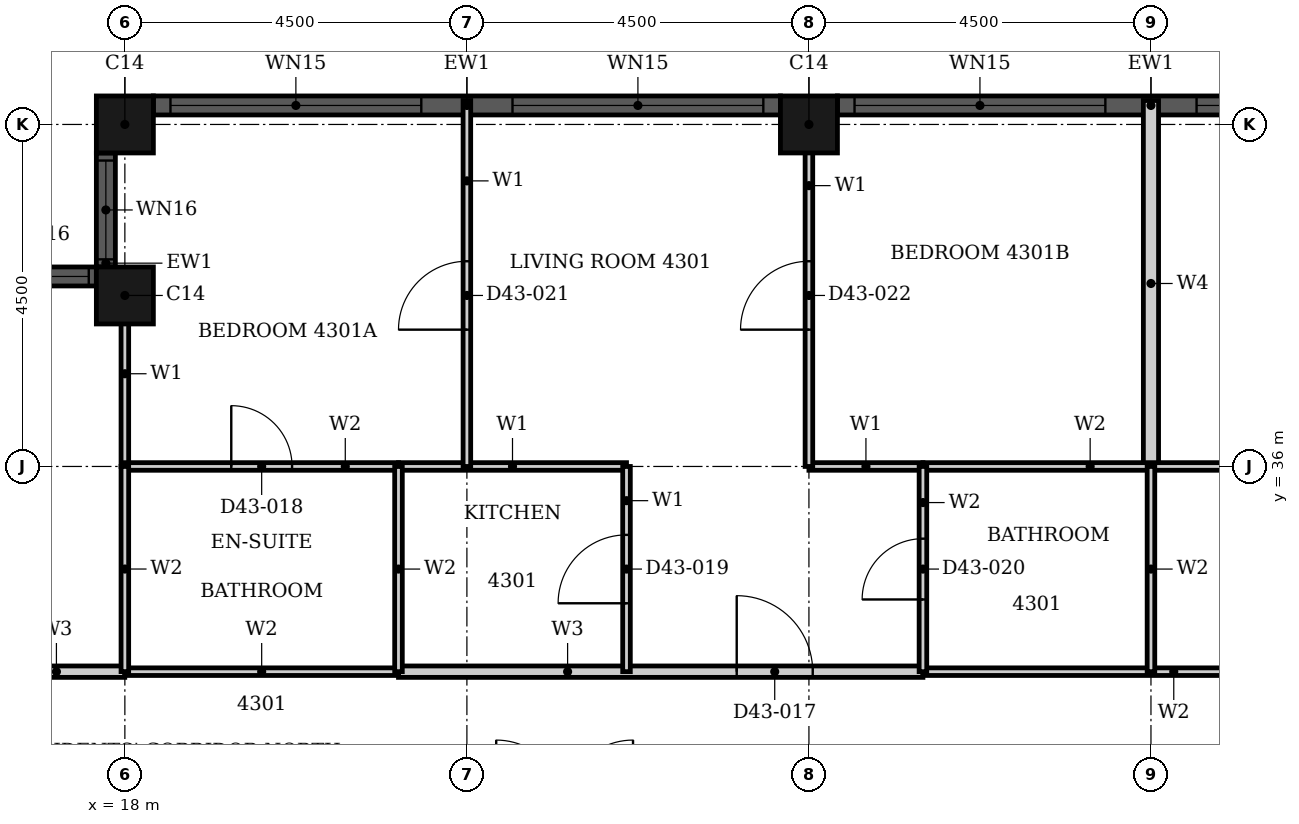
"""IFC4 building model, lengths in metres.
Left out: names, types, materials, properties, quantities, classifications, styles, units other than length and angle.
Written with IfcOpenShell. Run it as: python <this file> out.ifc"""

import sys

from ifc_helpers import new_model, si_unit, direction, frame, frame_2d, origin, origin_2d, place, context, subcontext, project, spatial, rectangle, hollow_rectangle, extrude, element, fill, save


model = new_model("IFC4")
c1 = context("Model", 3, precision=1e-05, world=origin(), true_north=direction((0.0, 1.0)))
c2 = subcontext(c1, "Body", "Model", "MODEL_VIEW")
j1 = project(units=[si_unit("LENGTHUNIT", "METRE"), si_unit("PLANEANGLEUNIT", "RADIAN")], contexts=[c1])
p1 = place(None, origin())
s1 = spatial("IfcSite", under=j1, at=p1, CompositionType="ELEMENT")
p2 = place(p1, origin())
s2 = spatial("IfcBuilding", under=s1, at=p2, CompositionType="ELEMENT")
p3 = place(p2, frame((0.0, 0.0, 172.8)))
s3 = spatial("IfcBuildingStorey", under=s2, at=p3, CompositionType="ELEMENT", Elevation=172.8)
for number, where, z_axis, x_axis in (
    (1, (27.0, 40.5, 0.0), (0.0, 0.0, 1.0), (1.0, 0.0, 0.0)),
    (2, (18.0, 40.5, 0.0), (0.0, 0.0, 1.0), (1.0, 0.0, 0.0)),
    (3, (18.0, 38.25, 0.0), (0.0, 0.0, 1.0), (1.0, 0.0, 0.0)),
):
    element("IfcColumn", number, at=place(p3, frame(where, z_axis=z_axis, x_axis=x_axis)), inside=s3, PredefinedType="COLUMN", context=c2, shape_type="SweptSolid", body=[
        extrude(hollow_rectangle(XDim=0.75, YDim=0.75, WallThickness=0.024, at=origin_2d()), origin(), (0.0, 0.0, 1.0), 3.7),
    ])
p4 = place(p3, frame((35.625, 40.75, 0.0), z_axis=(0.0, 0.0, 1.0), x_axis=(-1.0, 0.0, 0.0)))
e4 = element("IfcWall", 4, at=p4, inside=s3, PredefinedType="SOLIDWALL", context=c2, shape_type="SweptSolid", body=[
    extrude(rectangle(XDim=8.25, YDim=0.25, at=frame_2d((4.125, 0.0))), origin(), (0.0, 0.0, 1.0), 3.7),
])
p5 = place(p4, frame((0.225, 0.0, 0.45)))
e5 = element("IfcOpeningElement", 5, at=p5, cuts=e4, PredefinedType="OPENING", context=c2, shape_type="SweptSolid", body=[
    extrude(rectangle(XDim=3.3, YDim=2.3, at=frame_2d((1.65, 1.15))), frame((0.0, 0.135, 0.0), z_axis=(0.0, -1.0, 0.0), x_axis=(1.0, 0.0, 0.0)), (0.0, 0.0, 1.0), 0.27),
])
p6 = place(p4, frame((4.725, 0.0, 0.45)))
e6 = element("IfcOpeningElement", 6, at=p6, cuts=e4, PredefinedType="OPENING", context=c2, shape_type="SweptSolid", body=[
    extrude(rectangle(XDim=3.3, YDim=2.3, at=frame_2d((1.65, 1.15))), frame((0.0, 0.135, 0.0), z_axis=(0.0, -1.0, 0.0), x_axis=(1.0, 0.0, 0.0)), (0.0, 0.0, 1.0), 0.27),
])
p7 = place(p3, frame((26.625, 40.75, 0.0), z_axis=(0.0, 0.0, 1.0), x_axis=(-1.0, 0.0, 0.0)))
e7 = element("IfcWall", 7, at=p7, inside=s3, PredefinedType="SOLIDWALL", context=c2, shape_type="SweptSolid", body=[
    extrude(rectangle(XDim=8.25, YDim=0.25, at=frame_2d((4.125, 0.0))), origin(), (0.0, 0.0, 1.0), 3.7),
])
p8 = place(p7, frame((0.225, 0.0, 0.45)))
e8 = element("IfcOpeningElement", 8, at=p8, cuts=e7, PredefinedType="OPENING", context=c2, shape_type="SweptSolid", body=[
    extrude(rectangle(XDim=3.3, YDim=2.3, at=frame_2d((1.65, 1.15))), frame((0.0, 0.135, 0.0), z_axis=(0.0, -1.0, 0.0), x_axis=(1.0, 0.0, 0.0)), (0.0, 0.0, 1.0), 0.27),
])
p9 = place(p7, frame((4.725, 0.0, 0.45)))
e9 = element("IfcOpeningElement", 9, at=p9, cuts=e7, PredefinedType="OPENING", context=c2, shape_type="SweptSolid", body=[
    extrude(rectangle(XDim=3.3, YDim=2.3, at=frame_2d((1.65, 1.15))), frame((0.0, 0.135, 0.0), z_axis=(0.0, -1.0, 0.0), x_axis=(1.0, 0.0, 0.0)), (0.0, 0.0, 1.0), 0.27),
])
p10 = place(p3, frame((17.75, 40.125, 0.0), z_axis=(0.0, 0.0, 1.0), x_axis=(0.0, -1.0, 0.0)))
e10 = element("IfcWall", 10, at=p10, inside=s3, PredefinedType="SOLIDWALL", context=c2, shape_type="SweptSolid", body=[
    extrude(rectangle(XDim=1.5, YDim=0.25, at=frame_2d((0.75, 0.0))), origin(), (0.0, 0.0, 1.0), 3.7),
])
p11 = place(p10, frame((0.1, 0.0, 0.9)))
e11 = element("IfcOpeningElement", 11, at=p11, cuts=e10, PredefinedType="OPENING", context=c2, shape_type="SweptSolid", body=[
    extrude(rectangle(XDim=1.3, YDim=1.85, at=frame_2d((0.65, 0.925))), frame((0.0, 0.135, 0.0), z_axis=(0.0, -1.0, 0.0), x_axis=(1.0, 0.0, 0.0)), (0.0, 0.0, 1.0), 0.27),
])
p12 = place(p3, frame((17.625, 38.5, 0.0), z_axis=(0.0, 0.0, 1.0), x_axis=(-1.0, 0.0, 0.0)))
e12 = element("IfcWall", 12, at=p12, inside=s3, PredefinedType="SOLIDWALL", context=c2, shape_type="SweptSolid", body=[
    extrude(rectangle(XDim=1.5, YDim=0.25, at=frame_2d((0.75, 0.0))), origin(), (0.0, 0.0, 1.0), 3.7),
])
p13 = place(p12, frame((0.1, 0.0, 0.9)))
e13 = element("IfcOpeningElement", 13, at=p13, cuts=e12, PredefinedType="OPENING", context=c2, shape_type="SweptSolid", body=[
    extrude(rectangle(XDim=1.3, YDim=1.85, at=frame_2d((0.65, 0.925))), frame((0.0, 0.135, 0.0), z_axis=(0.0, -1.0, 0.0), x_axis=(1.0, 0.0, 0.0)), (0.0, 0.0, 1.0), 0.27),
])
p14 = place(p3, frame((21.6, 33.3, 0.0), z_axis=(0.0, 0.0, 1.0), x_axis=(1.0, 0.0, 0.0)))
e14 = element("IfcWall", 14, at=p14, inside=s3, PredefinedType="PARTITIONING", context=c2, shape_type="SweptSolid", body=[
    extrude(rectangle(XDim=6.9, YDim=0.15, at=frame_2d((3.45, 0.0))), origin(), (0.0, 0.0, 1.0), 3.4),
])
p15 = place(p14, frame((4.45, 0.0, 0.0)))
e15 = element("IfcOpeningElement", 15, at=p15, cuts=e14, PredefinedType="OPENING", context=c2, shape_type="SweptSolid", body=[
    extrude(rectangle(XDim=1.0, YDim=2.2, at=frame_2d((0.5, 1.1))), frame((0.0, 0.085, 0.0), z_axis=(0.0, -1.0, 0.0), x_axis=(1.0, 0.0, 0.0)), (0.0, 0.0, 1.0), 0.17),
])
p16 = place(p3, frame((16.2, 33.3, 0.0), z_axis=(0.0, 0.0, 1.0), x_axis=(1.0, 0.0, 0.0)))
e16 = element("IfcWall", 16, at=p16, inside=s3, PredefinedType="PARTITIONING", context=c2, shape_type="SweptSolid", body=[
    extrude(rectangle(XDim=1.799, YDim=0.15, at=frame_2d((0.899, 0.0))), origin(), (0.0, 0.0, 1.0), 3.4),
])
p17 = place(p3, frame((27.0, 36.0, 0.0), z_axis=(0.0, 0.0, 1.0), x_axis=(1.0, 0.0, 0.0)))
e17 = element("IfcWall", 17, at=p17, inside=s3, PredefinedType="PARTITIONING", context=c2, shape_type="SweptSolid", body=[
    extrude(rectangle(XDim=1.5, YDim=0.1, at=frame_2d((0.75, 0.0))), origin(), (0.0, 0.0, 1.0), 3.4),
])
p18 = place(p3, frame((21.6, 36.0, 0.0), z_axis=(0.0, 0.0, 1.0), x_axis=(1.0, 0.0, 0.0)))
e18 = element("IfcWall", 18, at=p18, inside=s3, PredefinedType="PARTITIONING", context=c2, shape_type="SweptSolid", body=[
    extrude(rectangle(XDim=3.0, YDim=0.1, at=frame_2d((1.5, 0.0))), origin(), (0.0, 0.0, 1.0), 3.4),
])
p19 = place(p3, frame((18.0, 36.0, 0.0), z_axis=(0.0, 0.0, 1.0), x_axis=(0.0, 1.0, 0.0)))
e19 = element("IfcWall", 19, at=p19, inside=s3, PredefinedType="PARTITIONING", context=c2, shape_type="SweptSolid", body=[
    extrude(rectangle(XDim=2.44, YDim=0.1, at=frame_2d((1.22, 0.0))), origin(), (0.0, 0.0, 1.0), 3.4),
])
p20 = place(p3, frame((22.5, 36.0, 0.0), z_axis=(0.0, 0.0, 1.0), x_axis=(0.0, 1.0, 0.0)))
e20 = element("IfcWall", 20, at=p20, inside=s3, PredefinedType="PARTITIONING", context=c2, shape_type="SweptSolid", body=[
    extrude(rectangle(XDim=4.815, YDim=0.1, at=frame_2d((2.407, 0.0))), origin(), (0.0, 0.0, 1.0), 3.4),
])
p21 = place(p20, frame((1.8, 0.0, 0.0)))
e21 = element("IfcOpeningElement", 21, at=p21, cuts=e20, PredefinedType="OPENING", context=c2, shape_type="SweptSolid", body=[
    extrude(rectangle(XDim=0.9, YDim=2.1, at=frame_2d((0.45, 1.05))), frame((0.0, 0.06, 0.0), z_axis=(0.0, -1.0, 0.0), x_axis=(1.0, 0.0, 0.0)), (0.0, 0.0, 1.0), 0.12),
])
p22 = place(p3, frame((24.6, 33.3, 0.0), z_axis=(0.0, 0.0, 1.0), x_axis=(0.0, 1.0, 0.0)))
e22 = element("IfcWall", 22, at=p22, inside=s3, PredefinedType="PARTITIONING", context=c2, shape_type="SweptSolid", body=[
    extrude(rectangle(XDim=2.7, YDim=0.1, at=frame_2d((1.35, 0.0))), origin(), (0.0, 0.0, 1.0), 3.4),
])
p23 = place(p22, frame((0.9, 0.0, 0.0)))
e23 = element("IfcOpeningElement", 23, at=p23, cuts=e22, PredefinedType="OPENING", context=c2, shape_type="SweptSolid", body=[
    extrude(rectangle(XDim=0.9, YDim=2.1, at=frame_2d((0.45, 1.05))), frame((0.0, 0.06, 0.0), z_axis=(0.0, -1.0, 0.0), x_axis=(1.0, 0.0, 0.0)), (0.0, 0.0, 1.0), 0.12),
])
p24 = place(p3, frame((27.0, 36.0, 0.0), z_axis=(0.0, 0.0, 1.0), x_axis=(0.0, 1.0, 0.0)))
e24 = element("IfcWall", 24, at=p24, inside=s3, PredefinedType="PARTITIONING", context=c2, shape_type="SweptSolid", body=[
    extrude(rectangle(XDim=4.69, YDim=0.1, at=frame_2d((2.345, 0.0))), origin(), (0.0, 0.0, 1.0), 3.4),
])
p25 = place(p24, frame((1.8, 0.0, 0.0)))
e25 = element("IfcOpeningElement", 25, at=p25, cuts=e24, PredefinedType="OPENING", context=c2, shape_type="SweptSolid", body=[
    extrude(rectangle(XDim=0.9, YDim=2.1, at=frame_2d((0.45, 1.05))), frame((0.0, 0.06, 0.0), z_axis=(0.0, -1.0, 0.0), x_axis=(1.0, 0.0, 0.0)), (0.0, 0.0, 1.0), 0.12),
])
p26 = place(p3, frame((31.5, 36.0, 0.0), z_axis=(0.0, 0.0, 1.0), x_axis=(0.0, 1.0, 0.0)))
e26 = element("IfcWall", 26, at=p26, inside=s3, PredefinedType="PARTITIONING", context=c2, shape_type="SweptSolid", body=[
    extrude(rectangle(XDim=4.815, YDim=0.2, at=frame_2d((2.407, 0.0))), origin(), (0.0, 0.0, 1.0), 3.4),
])
p27 = place(p3, frame((28.5, 33.3, 0.0), z_axis=(0.0, 0.0, 1.0), x_axis=(1.0, 0.0, 0.0)))
e27 = element("IfcWall", 27, at=p27, inside=s3, PredefinedType="PARTITIONING", context=c2, shape_type="SweptSolid", body=[
    extrude(rectangle(XDim=6.6, YDim=0.1, at=frame_2d((3.3, 0.0))), origin(), (0.0, 0.0, 1.0), 3.4),
])
p28 = place(p3, frame((18.0, 33.3, 0.0), z_axis=(0.0, 0.0, 1.0), x_axis=(1.0, 0.0, 0.0)))
e28 = element("IfcWall", 28, at=p28, inside=s3, PredefinedType="PARTITIONING", context=c2, shape_type="SweptSolid", body=[
    extrude(rectangle(XDim=3.6, YDim=0.1, at=frame_2d((1.8, 0.0))), origin(), (0.0, 0.0, 1.0), 3.4),
])
p29 = place(p3, frame((28.5, 36.0, 0.0), z_axis=(0.0, 0.0, 1.0), x_axis=(1.0, 0.0, 0.0)))
e29 = element("IfcWall", 29, at=p29, inside=s3, PredefinedType="PARTITIONING", context=c2, shape_type="SweptSolid", body=[
    extrude(rectangle(XDim=6.6, YDim=0.1, at=frame_2d((3.3, 0.0))), origin(), (0.0, 0.0, 1.0), 3.4),
])
p30 = place(p29, frame((4.4, 0.0, 0.0)))
e30 = element("IfcOpeningElement", 30, at=p30, cuts=e29, PredefinedType="OPENING", context=c2, shape_type="SweptSolid", body=[
    extrude(rectangle(XDim=0.8, YDim=2.1, at=frame_2d((0.4, 1.05))), frame((0.0, 0.06, 0.0), z_axis=(0.0, -1.0, 0.0), x_axis=(1.0, 0.0, 0.0)), (0.0, 0.0, 1.0), 0.12),
])
p31 = place(p3, frame((18.0, 36.0, 0.0), z_axis=(0.0, 0.0, 1.0), x_axis=(1.0, 0.0, 0.0)))
e31 = element("IfcWall", 31, at=p31, inside=s3, PredefinedType="PARTITIONING", context=c2, shape_type="SweptSolid", body=[
    extrude(rectangle(XDim=3.6, YDim=0.1, at=frame_2d((1.8, 0.0))), origin(), (0.0, 0.0, 1.0), 3.4),
])
p32 = place(p31, frame((1.4, 0.0, 0.0)))
e32 = element("IfcOpeningElement", 32, at=p32, cuts=e31, PredefinedType="OPENING", context=c2, shape_type="SweptSolid", body=[
    extrude(rectangle(XDim=0.8, YDim=2.1, at=frame_2d((0.4, 1.05))), frame((0.0, 0.06, 0.0), z_axis=(0.0, -1.0, 0.0), x_axis=(1.0, 0.0, 0.0)), (0.0, 0.0, 1.0), 0.12),
])
p33 = place(p3, frame((18.0, 33.301, 0.0), z_axis=(0.0, 0.0, 1.0), x_axis=(0.0, 1.0, 0.0)))
e33 = element("IfcWall", 33, at=p33, inside=s3, PredefinedType="PARTITIONING", context=c2, shape_type="SweptSolid", body=[
    extrude(rectangle(XDim=2.699, YDim=0.1, at=frame_2d((1.35, 0.0))), origin(), (0.0, 0.0, 1.0), 3.4),
])
p34 = place(p3, frame((21.6, 33.3, 0.0), z_axis=(0.0, 0.0, 1.0), x_axis=(0.0, 1.0, 0.0)))
e34 = element("IfcWall", 34, at=p34, inside=s3, PredefinedType="PARTITIONING", context=c2, shape_type="SweptSolid", body=[
    extrude(rectangle(XDim=2.7, YDim=0.1, at=frame_2d((1.35, 0.0))), origin(), (0.0, 0.0, 1.0), 3.4),
])
p35 = place(p3, frame((28.5, 33.3, 0.0), z_axis=(0.0, 0.0, 1.0), x_axis=(0.0, 1.0, 0.0)))
e35 = element("IfcWall", 35, at=p35, inside=s3, PredefinedType="PARTITIONING", context=c2, shape_type="SweptSolid", body=[
    extrude(rectangle(XDim=2.7, YDim=0.1, at=frame_2d((1.35, 0.0))), origin(), (0.0, 0.0, 1.0), 3.4),
])
p36 = place(p35, frame((0.95, 0.0, 0.0)))
e36 = element("IfcOpeningElement", 36, at=p36, cuts=e35, PredefinedType="OPENING", context=c2, shape_type="SweptSolid", body=[
    extrude(rectangle(XDim=0.8, YDim=2.1, at=frame_2d((0.4, 1.05))), frame((0.0, 0.06, 0.0), z_axis=(0.0, -1.0, 0.0), x_axis=(1.0, 0.0, 0.0)), (0.0, 0.0, 1.0), 0.12),
])
p37 = place(p3, frame((31.5, 33.3, 0.0), z_axis=(0.0, 0.0, 1.0), x_axis=(0.0, 1.0, 0.0)))
e37 = element("IfcWall", 37, at=p37, inside=s3, PredefinedType="PARTITIONING", context=c2, shape_type="SweptSolid", body=[
    extrude(rectangle(XDim=2.7, YDim=0.1, at=frame_2d((1.35, 0.0))), origin(), (0.0, 0.0, 1.0), 3.4),
])
p38 = place(p5, origin())
e38 = element("IfcWindow", 38, at=p38, inside=s3, PartitioningType="SINGLE_PANEL", PredefinedType="WINDOW", context=c2, shape_type="SweptSolid", body=[
    extrude(rectangle(XDim=3.3, YDim=2.3, at=frame_2d((1.65, 1.15))), frame((0.0, 0.03, 0.0), z_axis=(0.0, -1.0, 0.0), x_axis=(1.0, 0.0, 0.0)), (0.0, 0.0, 1.0), 0.06),
])
fill(e5, e38)
p39 = place(p6, origin())
e39 = element("IfcWindow", 39, at=p39, inside=s3, PartitioningType="SINGLE_PANEL", PredefinedType="WINDOW", context=c2, shape_type="SweptSolid", body=[
    extrude(rectangle(XDim=3.3, YDim=2.3, at=frame_2d((1.65, 1.15))), frame((0.0, 0.03, 0.0), z_axis=(0.0, -1.0, 0.0), x_axis=(1.0, 0.0, 0.0)), (0.0, 0.0, 1.0), 0.06),
])
fill(e6, e39)
p40 = place(p8, origin())
e40 = element("IfcWindow", 40, at=p40, inside=s3, PartitioningType="SINGLE_PANEL", PredefinedType="WINDOW", context=c2, shape_type="SweptSolid", body=[
    extrude(rectangle(XDim=3.3, YDim=2.3, at=frame_2d((1.65, 1.15))), frame((0.0, 0.03, 0.0), z_axis=(0.0, -1.0, 0.0), x_axis=(1.0, 0.0, 0.0)), (0.0, 0.0, 1.0), 0.06),
])
fill(e8, e40)
p41 = place(p9, origin())
e41 = element("IfcWindow", 41, at=p41, inside=s3, PartitioningType="SINGLE_PANEL", PredefinedType="WINDOW", context=c2, shape_type="SweptSolid", body=[
    extrude(rectangle(XDim=3.3, YDim=2.3, at=frame_2d((1.65, 1.15))), frame((0.0, 0.03, 0.0), z_axis=(0.0, -1.0, 0.0), x_axis=(1.0, 0.0, 0.0)), (0.0, 0.0, 1.0), 0.06),
])
fill(e9, e41)
p42 = place(p11, origin())
e42 = element("IfcWindow", 42, at=p42, inside=s3, PartitioningType="SINGLE_PANEL", PredefinedType="WINDOW", context=c2, shape_type="SweptSolid", body=[
    extrude(rectangle(XDim=1.3, YDim=1.85, at=frame_2d((0.65, 0.925))), frame((0.0, 0.03, 0.0), z_axis=(0.0, -1.0, 0.0), x_axis=(1.0, 0.0, 0.0)), (0.0, 0.0, 1.0), 0.06),
])
fill(e11, e42)
p43 = place(p13, origin())
e43 = element("IfcWindow", 43, at=p43, inside=s3, PartitioningType="SINGLE_PANEL", PredefinedType="WINDOW", context=c2, shape_type="SweptSolid", body=[
    extrude(rectangle(XDim=1.3, YDim=1.85, at=frame_2d((0.65, 0.925))), frame((0.0, 0.03, 0.0), z_axis=(0.0, -1.0, 0.0), x_axis=(1.0, 0.0, 0.0)), (0.0, 0.0, 1.0), 0.06),
])
fill(e13, e43)
p44 = place(p15, origin())
e44 = element("IfcDoor", 44, at=p44, inside=s3, OperationType="SINGLE_SWING_LEFT", PredefinedType="DOOR", context=c2, shape_type="SweptSolid", body=[
    extrude(rectangle(XDim=1.0, YDim=2.2, at=frame_2d((0.5, 1.1))), frame((0.0, 0.025, 0.0), z_axis=(0.0, -1.0, 0.0), x_axis=(1.0, 0.0, 0.0)), (0.0, 0.0, 1.0), 0.05),
])
fill(e15, e44)
p45 = place(p32, origin())
e45 = element("IfcDoor", 45, at=p45, inside=s3, OperationType="SINGLE_SWING_RIGHT", PredefinedType="DOOR", context=c2, shape_type="SweptSolid", body=[
    extrude(rectangle(XDim=0.8, YDim=2.1, at=frame_2d((0.4, 1.05))), frame((0.0, 0.025, 0.0), z_axis=(0.0, -1.0, 0.0), x_axis=(1.0, 0.0, 0.0)), (0.0, 0.0, 1.0), 0.05),
])
fill(e32, e45)
p46 = place(p23, origin())
e46 = element("IfcDoor", 46, at=p46, inside=s3, OperationType="SINGLE_SWING_LEFT", PredefinedType="DOOR", context=c2, shape_type="SweptSolid", body=[
    extrude(rectangle(XDim=0.9, YDim=2.1, at=frame_2d((0.45, 1.05))), frame((0.0, 0.025, 0.0), z_axis=(0.0, -1.0, 0.0), x_axis=(1.0, 0.0, 0.0)), (0.0, 0.0, 1.0), 0.05),
])
fill(e23, e46)
p47 = place(p36, origin())
e47 = element("IfcDoor", 47, at=p47, inside=s3, OperationType="SINGLE_SWING_RIGHT", PredefinedType="DOOR", context=c2, shape_type="SweptSolid", body=[
    extrude(rectangle(XDim=0.8, YDim=2.1, at=frame_2d((0.4, 1.05))), frame((0.0, 0.025, 0.0), z_axis=(0.0, -1.0, 0.0), x_axis=(1.0, 0.0, 0.0)), (0.0, 0.0, 1.0), 0.05),
])
fill(e36, e47)
p48 = place(p21, origin())
e48 = element("IfcDoor", 48, at=p48, inside=s3, OperationType="SINGLE_SWING_RIGHT", PredefinedType="DOOR", context=c2, shape_type="SweptSolid", body=[
    extrude(rectangle(XDim=0.9, YDim=2.1, at=frame_2d((0.45, 1.05))), frame((0.0, 0.025, 0.0), z_axis=(0.0, -1.0, 0.0), x_axis=(1.0, 0.0, 0.0)), (0.0, 0.0, 1.0), 0.05),
])
fill(e21, e48)
p49 = place(p25, origin())
e49 = element("IfcDoor", 49, at=p49, inside=s3, OperationType="SINGLE_SWING_RIGHT", PredefinedType="DOOR", context=c2, shape_type="SweptSolid", body=[
    extrude(rectangle(XDim=0.9, YDim=2.1, at=frame_2d((0.45, 1.05))), frame((0.0, 0.025, 0.0), z_axis=(0.0, -1.0, 0.0), x_axis=(1.0, 0.0, 0.0)), (0.0, 0.0, 1.0), 0.05),
])
fill(e25, e49)
save(model, sys.argv[1])
